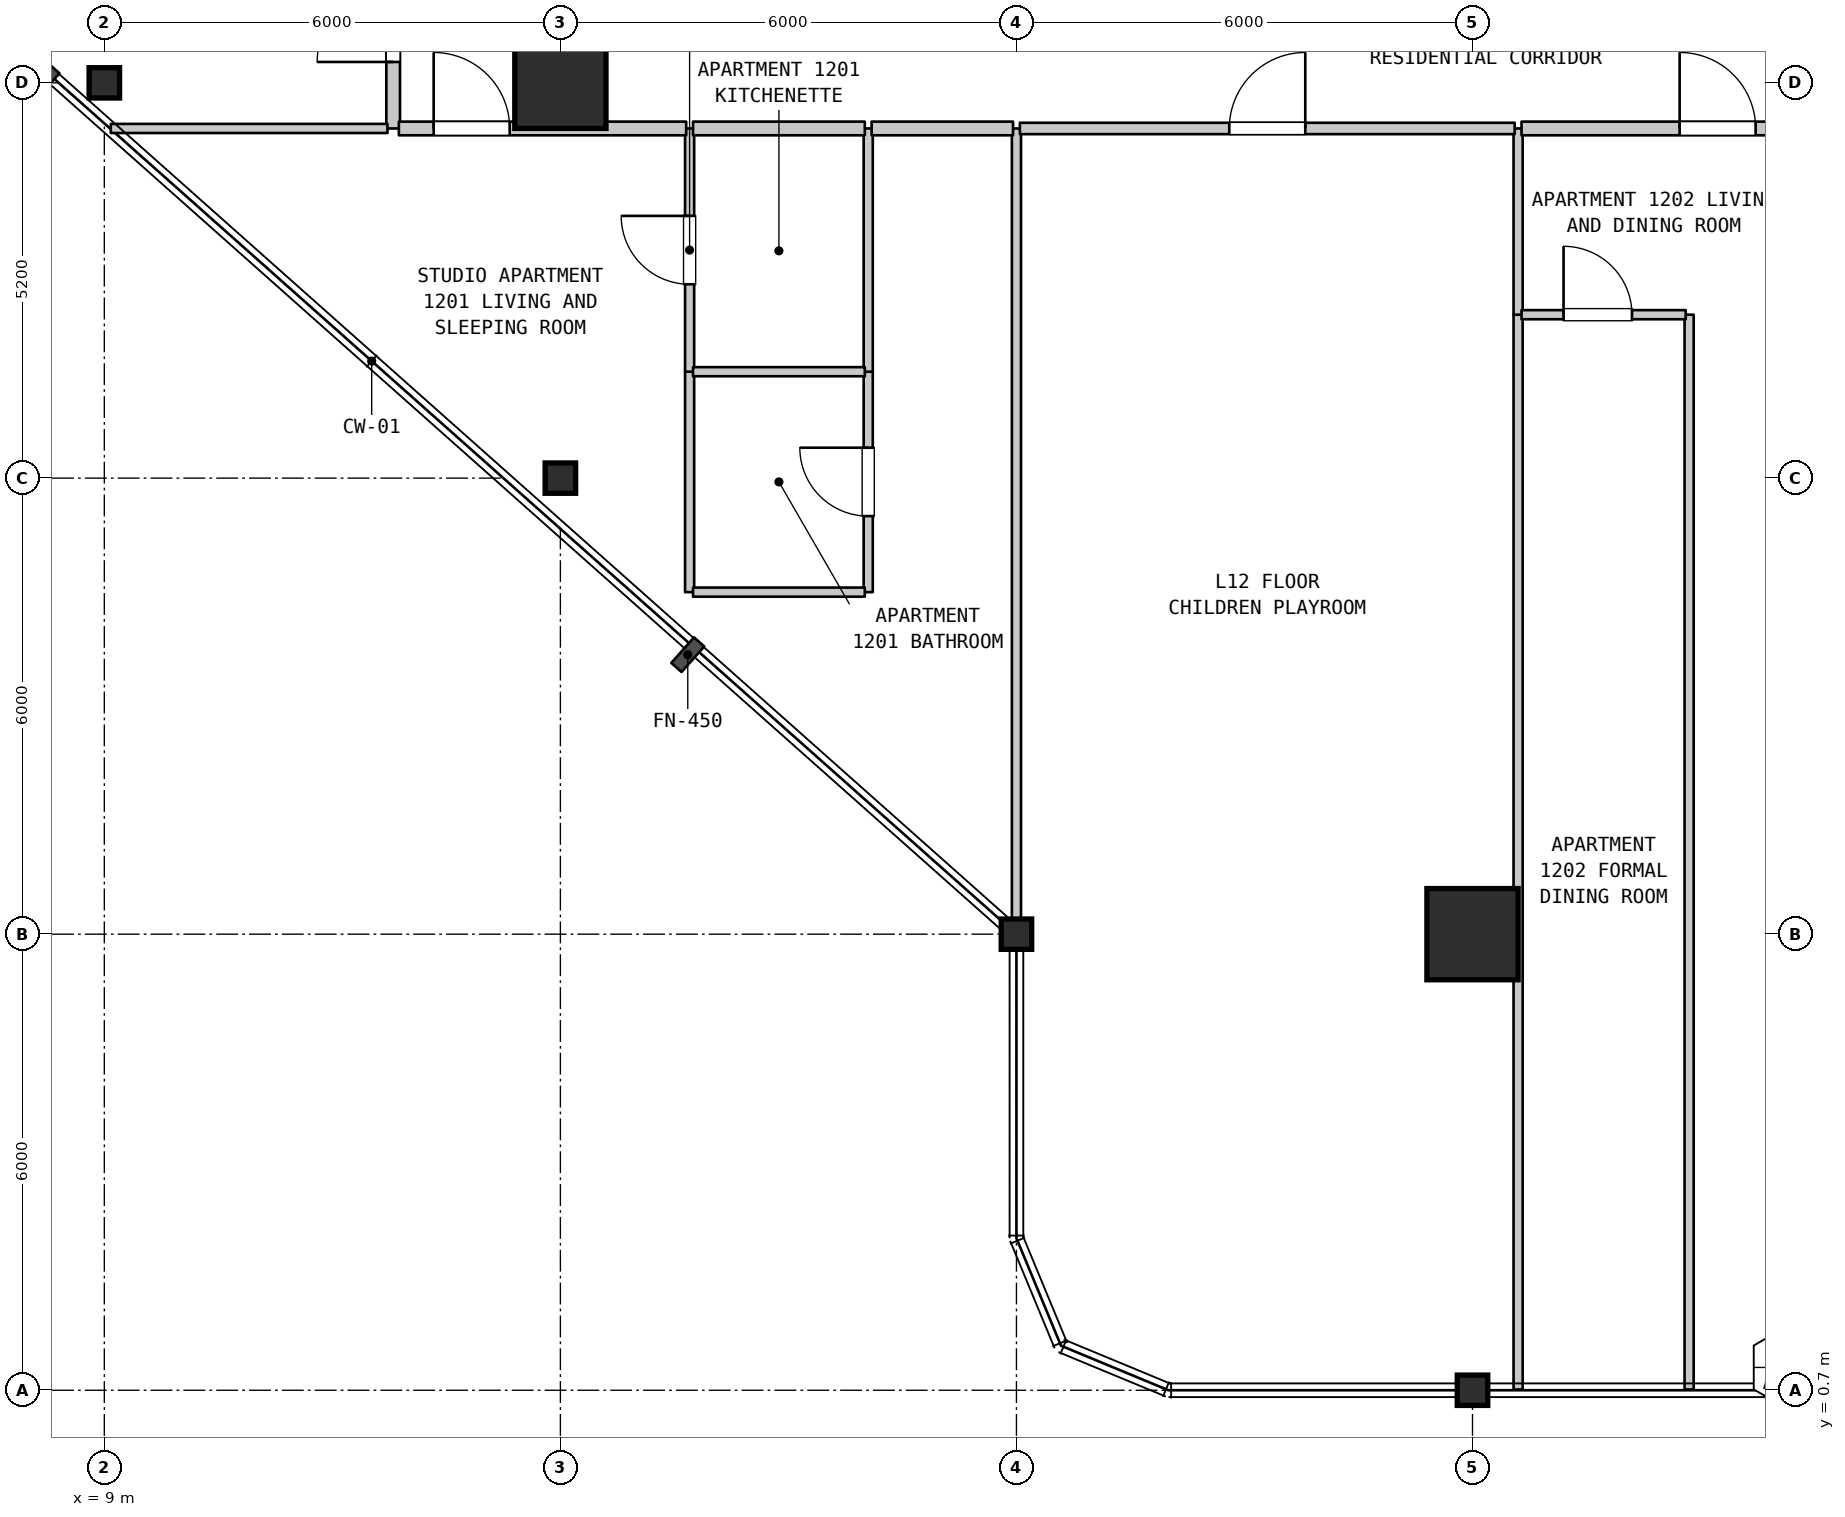
"""IFC4 building model, lengths in metres.
Left out: names, types, materials, properties, quantities, classifications, styles, units other than length and angle.
Written with IfcOpenShell. Run it as: python <this file> out.ifc"""

import sys

from ifc_helpers import new_model, si_unit, direction, frame, frame_2d, origin, origin_2d, place, context, subcontext, project, spatial, rectangle, i_section, extrude, element, fill, save


model = new_model("IFC4")
c1 = context("Model", 3, precision=1e-05, world=origin(), true_north=direction((0.0, 1.0)))
c2 = subcontext(c1, "Body", "Model", "MODEL_VIEW")
j1 = project(units=[si_unit("LENGTHUNIT", "METRE"), si_unit("PLANEANGLEUNIT", "RADIAN")], contexts=[c1])
p1 = place(None, origin())
s1 = spatial("IfcSite", under=j1, at=p1, CompositionType="ELEMENT")
p2 = place(p1, origin())
s2 = spatial("IfcBuilding", under=s1, at=p2, CompositionType="ELEMENT")
p3 = place(p2, frame((0.0, 0.0, 53.6)))
s3 = spatial("IfcBuildingStorey", under=s2, at=p3, CompositionType="ELEMENT", Elevation=53.6)
for number, where, z_axis, x_axis in (
    (1, (9.0, 17.9, 0.0), (0.0, 0.0, 1.0), (1.0, 0.0, 0.0)),
    (2, (15.0, 12.7, 0.0), (0.0, 0.0, 1.0), (1.0, 0.0, 0.0)),
):
    element("IfcColumn", number, at=place(p3, frame(where, z_axis=z_axis, x_axis=x_axis)), inside=s3, PredefinedType="COLUMN", context=c2, shape_type="SweptSolid", body=[
        extrude(i_section(OverallWidth=0.401, OverallDepth=0.399, WebThickness=0.025, FlangeThickness=0.04, FilletRadius=0.015, at=origin_2d()), origin(), (0.0, 0.0, 1.0), 3.7),
    ])
p4 = place(p3, frame((15.0, 17.9, 0.0), z_axis=(0.0, 0.0, 1.0), x_axis=(1.0, 0.0, 0.0)))
e3 = element("IfcColumn", 3, at=p4, inside=s3, PredefinedType="COLUMN", context=c2, shape_type="SweptSolid", body=[
    extrude(rectangle(XDim=1.2, YDim=1.2, at=origin_2d()), origin(), (0.0, 0.0, 1.0), 3.7),
])
for number, where, z_axis, x_axis in (
    (4, (21.0, 6.7, 0.0), (0.0, 0.0, 1.0), (1.0, 0.0, 0.0)),
    (5, (27.0, 0.7, 0.0), (0.0, 0.0, 1.0), (1.0, 0.0, 0.0)),
):
    element("IfcColumn", number, at=place(p3, frame(where, z_axis=z_axis, x_axis=x_axis)), inside=s3, PredefinedType="COLUMN", context=c2, shape_type="SweptSolid", body=[
        extrude(i_section(OverallWidth=0.401, OverallDepth=0.399, WebThickness=0.025, FlangeThickness=0.04, FilletRadius=0.015, at=origin_2d()), origin(), (0.0, 0.0, 1.0), 3.7),
    ])
p5 = place(p3, frame((27.0, 6.7, 0.0), z_axis=(0.0, 0.0, 1.0), x_axis=(1.0, 0.0, 0.0)))
e6 = element("IfcColumn", 6, at=p5, inside=s3, PredefinedType="COLUMN", context=c2, shape_type="SweptSolid", body=[
    extrude(rectangle(XDim=1.2, YDim=1.2, at=origin_2d()), origin(), (0.0, 0.0, 1.0), 3.7),
])
p6 = place(p3, frame((12.8, 17.3, 0.0), z_axis=(0.0, 0.0, 1.0), x_axis=(0.0, 1.0, 0.0)))
e7 = element("IfcWall", 7, at=p6, inside=s3, PredefinedType="STANDARD", context=c2, shape_type="SweptSolid", body=[
    extrude(rectangle(XDim=2.75, YDim=0.18, at=frame_2d((1.375, 0.0))), origin(), (0.0, 0.0, 1.0), 3.385),
])
p7 = place(p6, frame((0.875, 0.0, 0.0)))
e8 = element("IfcOpeningElement", 8, at=p7, cuts=e7, PredefinedType="OPENING", context=c2, shape_type="SweptSolid", body=[
    extrude(rectangle(XDim=1.0, YDim=2.15, at=frame_2d((0.5, 1.075))), frame((0.0, 0.1, 0.0), z_axis=(0.0, -1.0, 0.0), x_axis=(1.0, 0.0, 0.0)), (0.0, 0.0, 1.0), 0.2),
])
p8 = place(p3, frame((16.7, 11.2, 0.0), z_axis=(0.0, 0.0, 1.0), x_axis=(0.0, 1.0, 0.0)))
e9 = element("IfcWall", 9, at=p8, inside=s3, PredefinedType="PARTITIONING", context=c2, shape_type="SweptSolid", body=[
    extrude(rectangle(XDim=2.9, YDim=0.12, at=frame_2d((1.45, 0.0))), origin(), (0.0, 0.0, 1.0), 3.385),
])
p9 = place(p3, frame((16.7, 14.1, 0.0), z_axis=(0.0, 0.0, 1.0), x_axis=(0.0, 1.0, 0.0)))
e10 = element("IfcWall", 10, at=p9, inside=s3, PredefinedType="PARTITIONING", context=c2, shape_type="SweptSolid", body=[
    extrude(rectangle(XDim=3.2, YDim=0.12, at=frame_2d((1.6, 0.0))), origin(), (0.0, 0.0, 1.0), 3.385),
])
p10 = place(p9, frame((1.15, 0.0, 0.0)))
e11 = element("IfcOpeningElement", 11, at=p10, cuts=e10, PredefinedType="OPENING", context=c2, shape_type="SweptSolid", body=[
    extrude(rectangle(XDim=0.9, YDim=2.15, at=frame_2d((0.45, 1.075))), frame((0.0, 0.07, 0.0), z_axis=(0.0, -1.0, 0.0), x_axis=(1.0, 0.0, 0.0)), (0.0, 0.0, 1.0), 0.14),
])
p11 = place(p3, frame((19.05, 11.2, 0.0), z_axis=(0.0, 0.0, 1.0), x_axis=(0.0, 1.0, 0.0)))
e12 = element("IfcWall", 12, at=p11, inside=s3, PredefinedType="PARTITIONING", context=c2, shape_type="SweptSolid", body=[
    extrude(rectangle(XDim=2.9, YDim=0.12, at=frame_2d((1.45, 0.0))), origin(), (0.0, 0.0, 1.0), 3.385),
])
p12 = place(p11, frame((1.0, 0.0, 0.0)))
e13 = element("IfcOpeningElement", 13, at=p12, cuts=e12, PredefinedType="OPENING", context=c2, shape_type="SweptSolid", body=[
    extrude(rectangle(XDim=0.9, YDim=2.1, at=frame_2d((0.45, 1.05))), frame((0.0, 0.07, 0.0), z_axis=(0.0, -1.0, 0.0), x_axis=(1.0, 0.0, 0.0)), (0.0, 0.0, 1.0), 0.14),
])
p13 = place(p3, frame((19.05, 14.1, 0.0), z_axis=(0.0, 0.0, 1.0), x_axis=(0.0, 1.0, 0.0)))
e14 = element("IfcWall", 14, at=p13, inside=s3, PredefinedType="PARTITIONING", context=c2, shape_type="SweptSolid", body=[
    extrude(rectangle(XDim=3.2, YDim=0.12, at=frame_2d((1.6, 0.0))), origin(), (0.0, 0.0, 1.0), 3.385),
])
p14 = place(p3, frame((21.0, 6.71, 0.0), z_axis=(0.0, 0.0, 1.0), x_axis=(0.0, 1.0, 0.0)))
e15 = element("IfcWall", 15, at=p14, inside=s3, PredefinedType="PARTITIONING", context=c2, shape_type="SweptSolid", body=[
    extrude(rectangle(XDim=10.59, YDim=0.12, at=frame_2d((5.295, 0.0))), origin(), (0.0, 0.0, 1.0), 3.385),
])
p15 = place(p3, frame((27.6, 0.71, 0.0), z_axis=(0.0, 0.0, 1.0), x_axis=(0.0, 1.0, 0.0)))
e16 = element("IfcWall", 16, at=p15, inside=s3, PredefinedType="PARTITIONING", context=c2, shape_type="SweptSolid", body=[
    extrude(rectangle(XDim=14.14, YDim=0.12, at=frame_2d((7.07, 0.0))), origin(), (0.0, 0.0, 1.0), 3.385),
])
p16 = place(p3, frame((27.6, 14.85, 0.0), z_axis=(0.0, 0.0, 1.0), x_axis=(0.0, 1.0, 0.0)))
e17 = element("IfcWall", 17, at=p16, inside=s3, PredefinedType="PARTITIONING", context=c2, shape_type="SweptSolid", body=[
    extrude(rectangle(XDim=2.45, YDim=0.12, at=frame_2d((1.225, 0.0))), origin(), (0.0, 0.0, 1.0), 3.385),
])
p17 = place(p3, frame((29.85, 0.71, 0.0), z_axis=(0.0, 0.0, 1.0), x_axis=(0.0, 1.0, 0.0)))
e18 = element("IfcWall", 18, at=p17, inside=s3, PredefinedType="PARTITIONING", context=c2, shape_type="SweptSolid", body=[
    extrude(rectangle(XDim=14.14, YDim=0.12, at=frame_2d((7.07, 0.0))), origin(), (0.0, 0.0, 1.0), 3.385),
])
for number, where, z_axis, x_axis in (
    (19, (16.745, 11.2, 0.0), (0.0, 0.0, 1.0), (1.0, 0.0, 0.0)),
    (20, (16.745, 14.1, 0.0), (0.0, 0.0, 1.0), (1.0, 0.0, 0.0)),
):
    element("IfcWall", number, at=place(p3, frame(where, z_axis=z_axis, x_axis=x_axis)), inside=s3, PredefinedType="PARTITIONING", context=c2, shape_type="SweptSolid", body=[
        extrude(rectangle(XDim=2.26, YDim=0.12, at=frame_2d((1.13, 0.0))), origin(), (0.0, 0.0, 1.0), 3.385),
    ])
p18 = place(p3, frame((27.645, 14.85, 0.0), z_axis=(0.0, 0.0, 1.0), x_axis=(1.0, 0.0, 0.0)))
e21 = element("IfcWall", 21, at=p18, inside=s3, PredefinedType="PARTITIONING", context=c2, shape_type="SweptSolid", body=[
    extrude(rectangle(XDim=2.16, YDim=0.12, at=frame_2d((1.08, 0.0))), origin(), (0.0, 0.0, 1.0), 3.385),
])
p19 = place(p18, frame((0.553, 0.0, 0.0)))
e22 = element("IfcOpeningElement", 22, at=p19, cuts=e21, PredefinedType="OPENING", context=c2, shape_type="SweptSolid", body=[
    extrude(rectangle(XDim=0.9, YDim=2.15, at=frame_2d((0.45, 1.075))), frame((0.0, 0.07, 0.0), z_axis=(0.0, -1.0, 0.0), x_axis=(1.0, 0.0, 0.0)), (0.0, 0.0, 1.0), 0.14),
])
p20 = place(p3, frame((9.085, 17.3, 0.0), z_axis=(0.0, 0.0, 1.0), x_axis=(1.0, 0.0, 0.0)))
e23 = element("IfcWall", 23, at=p20, inside=s3, PredefinedType="PARTITIONING", context=c2, shape_type="SweptSolid", body=[
    extrude(rectangle(XDim=3.64, YDim=0.12, at=frame_2d((1.82, 0.0))), origin(), (0.0, 0.0, 1.0), 3.385),
])
p21 = place(p3, frame((12.875, 17.3, 0.0), z_axis=(0.0, 0.0, 1.0), x_axis=(1.0, 0.0, 0.0)))
e24 = element("IfcWall", 24, at=p21, inside=s3, PredefinedType="STANDARD", context=c2, shape_type="SweptSolid", body=[
    extrude(rectangle(XDim=3.78, YDim=0.18, at=frame_2d((1.89, 0.0))), origin(), (0.0, 0.0, 1.0), 3.385),
])
p22 = place(p21, frame((0.458, 0.0, 0.0)))
e25 = element("IfcOpeningElement", 25, at=p22, cuts=e24, PredefinedType="OPENING", context=c2, shape_type="SweptSolid", body=[
    extrude(rectangle(XDim=1.0, YDim=2.15, at=frame_2d((0.5, 1.075))), frame((0.0, 0.1, 0.0), z_axis=(0.0, -1.0, 0.0), x_axis=(1.0, 0.0, 0.0)), (0.0, 0.0, 1.0), 0.2),
])
p23 = place(p3, frame((16.745, 17.3, 0.0), z_axis=(0.0, 0.0, 1.0), x_axis=(1.0, 0.0, 0.0)))
e26 = element("IfcWall", 26, at=p23, inside=s3, PredefinedType="STANDARD", context=c2, shape_type="SweptSolid", body=[
    extrude(rectangle(XDim=2.26, YDim=0.18, at=frame_2d((1.13, 0.0))), origin(), (0.0, 0.0, 1.0), 3.385),
])
p24 = place(p3, frame((19.095, 17.3, 0.0), z_axis=(0.0, 0.0, 1.0), x_axis=(1.0, 0.0, 0.0)))
e27 = element("IfcWall", 27, at=p24, inside=s3, PredefinedType="STANDARD", context=c2, shape_type="SweptSolid", body=[
    extrude(rectangle(XDim=1.86, YDim=0.18, at=frame_2d((0.93, 0.0))), origin(), (0.0, 0.0, 1.0), 3.385),
])
p25 = place(p3, frame((21.045, 17.3, 0.0), z_axis=(0.0, 0.0, 1.0), x_axis=(1.0, 0.0, 0.0)))
e28 = element("IfcWall", 28, at=p25, inside=s3, PredefinedType="STANDARD", context=c2, shape_type="SweptSolid", body=[
    extrude(rectangle(XDim=6.51, YDim=0.15, at=frame_2d((3.255, 0.0))), origin(), (0.0, 0.0, 1.0), 3.385),
])
p26 = place(p25, frame((2.755, 0.0, 0.0)))
e29 = element("IfcOpeningElement", 29, at=p26, cuts=e28, PredefinedType="OPENING", context=c2, shape_type="SweptSolid", body=[
    extrude(rectangle(XDim=1.0, YDim=2.15, at=frame_2d((0.5, 1.075))), frame((0.0, 0.085, 0.0), z_axis=(0.0, -1.0, 0.0), x_axis=(1.0, 0.0, 0.0)), (0.0, 0.0, 1.0), 0.17),
])
p27 = place(p3, frame((27.645, 17.3, 0.0), z_axis=(0.0, 0.0, 1.0), x_axis=(1.0, 0.0, 0.0)))
e30 = element("IfcWall", 30, at=p27, inside=s3, PredefinedType="STANDARD", context=c2, shape_type="SweptSolid", body=[
    extrude(rectangle(XDim=5.095, YDim=0.18, at=frame_2d((2.547, 0.0))), origin(), (0.0, 0.0, 1.0), 3.385),
])
p28 = place(p27, frame((2.08, 0.0, 0.0)))
e31 = element("IfcOpeningElement", 31, at=p28, cuts=e30, PredefinedType="OPENING", context=c2, shape_type="SweptSolid", body=[
    extrude(rectangle(XDim=1.0, YDim=2.15, at=frame_2d((0.5, 1.075))), frame((0.0, 0.1, 0.0), z_axis=(0.0, -1.0, 0.0), x_axis=(1.0, 0.0, 0.0)), (0.0, 0.0, 1.0), 0.2),
])
p29 = place(p7, origin())
e32 = element("IfcDoor", 32, at=p29, inside=s3, OperationType="SINGLE_SWING_LEFT", PredefinedType="DOOR", context=c2, shape_type="SweptSolid", body=[
    extrude(rectangle(XDim=1.0, YDim=2.15, at=frame_2d((0.5, 1.075))), frame((0.0, 0.025, 0.0), z_axis=(0.0, -1.0, 0.0), x_axis=(1.0, 0.0, 0.0)), (0.0, 0.0, 1.0), 0.05),
])
fill(e8, e32)
p30 = place(p10, origin())
e33 = element("IfcDoor", 33, at=p30, inside=s3, OperationType="SINGLE_SWING_RIGHT", PredefinedType="DOOR", context=c2, shape_type="SweptSolid", body=[
    extrude(rectangle(XDim=0.9, YDim=2.15, at=frame_2d((0.45, 1.075))), frame((0.0, 0.025, 0.0), z_axis=(0.0, -1.0, 0.0), x_axis=(1.0, 0.0, 0.0)), (0.0, 0.0, 1.0), 0.05),
])
fill(e11, e33)
p31 = place(p12, origin())
e34 = element("IfcDoor", 34, at=p31, inside=s3, OperationType="SINGLE_SWING_RIGHT", PredefinedType="DOOR", context=c2, shape_type="SweptSolid", body=[
    extrude(rectangle(XDim=0.9, YDim=2.1, at=frame_2d((0.45, 1.05))), frame((0.0, 0.025, 0.0), z_axis=(0.0, -1.0, 0.0), x_axis=(1.0, 0.0, 0.0)), (0.0, 0.0, 1.0), 0.05),
])
fill(e13, e34)
p32 = place(p19, origin())
e35 = element("IfcDoor", 35, at=p32, inside=s3, OperationType="SINGLE_SWING_LEFT", PredefinedType="DOOR", context=c2, shape_type="SweptSolid", body=[
    extrude(rectangle(XDim=0.9, YDim=2.15, at=frame_2d((0.45, 1.075))), frame((0.0, 0.025, 0.0), z_axis=(0.0, -1.0, 0.0), x_axis=(1.0, 0.0, 0.0)), (0.0, 0.0, 1.0), 0.05),
])
fill(e22, e35)
p33 = place(p22, origin())
e36 = element("IfcDoor", 36, at=p33, inside=s3, OperationType="SINGLE_SWING_LEFT", PredefinedType="DOOR", context=c2, shape_type="SweptSolid", body=[
    extrude(rectangle(XDim=1.0, YDim=2.15, at=frame_2d((0.5, 1.075))), frame((0.0, 0.025, 0.0), z_axis=(0.0, -1.0, 0.0), x_axis=(1.0, 0.0, 0.0)), (0.0, 0.0, 1.0), 0.05),
])
fill(e25, e36)
p34 = place(p26, origin())
e37 = element("IfcDoor", 37, at=p34, inside=s3, OperationType="SINGLE_SWING_RIGHT", PredefinedType="DOOR", context=c2, shape_type="SweptSolid", body=[
    extrude(rectangle(XDim=1.0, YDim=2.15, at=frame_2d((0.5, 1.075))), frame((0.0, 0.025, 0.0), z_axis=(0.0, -1.0, 0.0), x_axis=(1.0, 0.0, 0.0)), (0.0, 0.0, 1.0), 0.05),
])
fill(e29, e37)
p35 = place(p28, origin())
e38 = element("IfcDoor", 38, at=p35, inside=s3, OperationType="SINGLE_SWING_LEFT", PredefinedType="DOOR", context=c2, shape_type="SweptSolid", body=[
    extrude(rectangle(XDim=1.0, YDim=2.15, at=frame_2d((0.5, 1.075))), frame((0.0, 0.025, 0.0), z_axis=(0.0, -1.0, 0.0), x_axis=(1.0, 0.0, 0.0)), (0.0, 0.0, 1.0), 0.05),
])
fill(e31, e38)
save(model, sys.argv[1])
